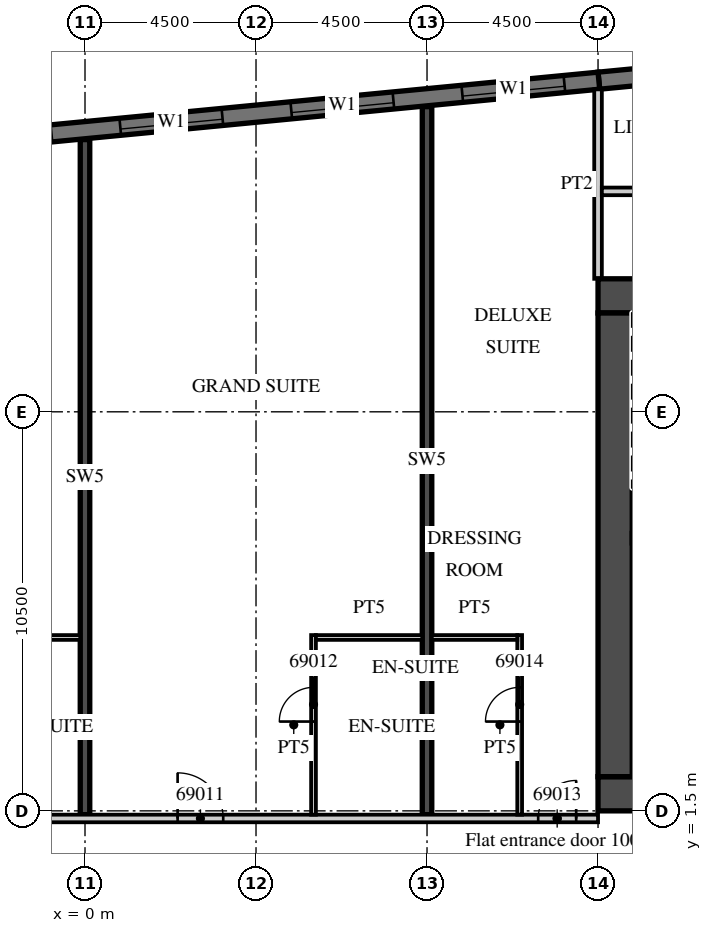
"""IFC4 building model, lengths in metres.
Left out: names, types, materials, properties, quantities, classifications, styles, units other than length and angle.
Written with IfcOpenShell. Run it as: python <this file> out.ifc"""

import sys

from ifc_helpers import new_model, si_unit, direction, frame, frame_2d, origin, place, context, subcontext, project, spatial, rectangle, extrude, element, fill, save


model = new_model("IFC4")
c1 = context("Model", 3, precision=1e-05, world=origin(), true_north=direction((0.0, 1.0)))
c2 = subcontext(c1, "Body", "Model", "MODEL_VIEW")
j1 = project(units=[si_unit("LENGTHUNIT", "METRE"), si_unit("PLANEANGLEUNIT", "RADIAN")], contexts=[c1])
p1 = place(None, origin())
s1 = spatial("IfcSite", under=j1, at=p1, CompositionType="ELEMENT")
p2 = place(p1, origin())
s2 = spatial("IfcBuilding", under=s1, at=p2, CompositionType="ELEMENT")
p3 = place(p2, frame((0.0, 0.0, 278.4)))
s3 = spatial("IfcBuildingStorey", under=s2, at=p3, CompositionType="ELEMENT", Elevation=278.4)
p4 = place(p3, frame((0.0, 1.4, 0.0), z_axis=(0.0, 0.0, 1.0), x_axis=(0.0, 1.0, 0.0)))
e1 = element("IfcWall", 1, at=p4, inside=s3, PredefinedType="SHEAR", context=c2, shape_type="SweptSolid", body=[
    extrude(rectangle(XDim=17.763, YDim=0.25, at=frame_2d((8.881, 0.0))), origin(), (0.0, 0.0, 1.0), 3.3),
])
p5 = place(p3, frame((9.0, 1.4, 0.0), z_axis=(0.0, 0.0, 1.0), x_axis=(0.0, 1.0, 0.0)))
e2 = element("IfcWall", 2, at=p5, inside=s3, PredefinedType="SHEAR", context=c2, shape_type="SweptSolid", body=[
    extrude(rectangle(XDim=18.629, YDim=0.25, at=frame_2d((9.315, 0.0))), origin(), (0.0, 0.0, 1.0), 3.3),
])
p6 = place(p3, frame((30.946, 22.391, 0.0), z_axis=(0.0, 0.0, 1.0), x_axis=(-0.995396397117, -0.095843688398, 0.0)))
e3 = element("IfcWall", 3, at=p6, inside=s3, PredefinedType="SOLIDWALL", context=c2, shape_type="SweptSolid", body=[
    extrude(rectangle(XDim=17.505, YDim=0.45, at=frame_2d((8.752, 0.0))), origin(), (0.0, 0.0, 1.0), 3.02),
])
p7 = place(p3, frame((13.521, 20.713, 0.0), z_axis=(0.0, 0.0, 1.0), x_axis=(-0.995396277313, -0.095844932638, 0.0)))
e4 = element("IfcWall", 4, at=p7, inside=s3, PredefinedType="SOLIDWALL", context=c2, shape_type="SweptSolid", body=[
    extrude(rectangle(XDim=51.495, YDim=0.45, at=frame_2d((25.748, 0.0))), origin(), (0.0, 0.0, 1.0), 3.02),
])
p8 = place(p7, frame((0.91, 0.0, 0.45)))
e5 = element("IfcOpeningElement", 5, at=p8, cuts=e4, PredefinedType="OPENING", context=c2, shape_type="SweptSolid", body=[
    extrude(rectangle(XDim=2.7, YDim=2.25, at=frame_2d((1.35, 1.125))), frame((0.0, 0.235, 0.0), z_axis=(0.0, -1.0, 0.0), x_axis=(1.0, 0.0, 0.0)), (0.0, 0.0, 1.0), 0.47),
])
p9 = place(p7, frame((5.431, 0.0, 0.45)))
e6 = element("IfcOpeningElement", 6, at=p9, cuts=e4, PredefinedType="OPENING", context=c2, shape_type="SweptSolid", body=[
    extrude(rectangle(XDim=2.7, YDim=2.25, at=frame_2d((1.35, 1.125))), frame((0.0, 0.235, 0.0), z_axis=(0.0, -1.0, 0.0), x_axis=(1.0, 0.0, 0.0)), (0.0, 0.0, 1.0), 0.47),
])
p10 = place(p7, frame((9.952, 0.0, 0.45)))
e7 = element("IfcOpeningElement", 7, at=p10, cuts=e4, PredefinedType="OPENING", context=c2, shape_type="SweptSolid", body=[
    extrude(rectangle(XDim=2.7, YDim=2.25, at=frame_2d((1.35, 1.125))), frame((0.0, 0.235, 0.0), z_axis=(0.0, -1.0, 0.0), x_axis=(1.0, 0.0, 0.0)), (0.0, 0.0, 1.0), 0.47),
])
p11 = place(p7, frame((14.473, 0.0, 0.45)))
e8 = element("IfcOpeningElement", 8, at=p11, cuts=e4, PredefinedType="OPENING", context=c2, shape_type="SweptSolid", body=[
    extrude(rectangle(XDim=2.7, YDim=2.25, at=frame_2d((1.35, 1.125))), frame((0.0, 0.235, 0.0), z_axis=(0.0, -1.0, 0.0), x_axis=(1.0, 0.0, 0.0)), (0.0, 0.0, 1.0), 0.47),
])
p12 = place(p7, frame((18.994, 0.0, 0.45)))
e9 = element("IfcOpeningElement", 9, at=p12, cuts=e4, PredefinedType="OPENING", context=c2, shape_type="SweptSolid", body=[
    extrude(rectangle(XDim=2.7, YDim=2.25, at=frame_2d((1.35, 1.125))), frame((0.0, 0.235, 0.0), z_axis=(0.0, -1.0, 0.0), x_axis=(1.0, 0.0, 0.0)), (0.0, 0.0, 1.0), 0.47),
])
p13 = place(p7, frame((23.514, 0.0, 0.45)))
e10 = element("IfcOpeningElement", 10, at=p13, cuts=e4, PredefinedType="OPENING", context=c2, shape_type="SweptSolid", body=[
    extrude(rectangle(XDim=2.7, YDim=2.25, at=frame_2d((1.35, 1.125))), frame((0.0, 0.235, 0.0), z_axis=(0.0, -1.0, 0.0), x_axis=(1.0, 0.0, 0.0)), (0.0, 0.0, 1.0), 0.47),
])
p14 = place(p7, frame((28.035, 0.0, 0.45)))
e11 = element("IfcOpeningElement", 11, at=p14, cuts=e4, PredefinedType="OPENING", context=c2, shape_type="SweptSolid", body=[
    extrude(rectangle(XDim=2.7, YDim=2.25, at=frame_2d((1.35, 1.125))), frame((0.0, 0.235, 0.0), z_axis=(0.0, -1.0, 0.0), x_axis=(1.0, 0.0, 0.0)), (0.0, 0.0, 1.0), 0.47),
])
p15 = place(p7, frame((32.556, 0.0, 0.45)))
e12 = element("IfcOpeningElement", 12, at=p15, cuts=e4, PredefinedType="OPENING", context=c2, shape_type="SweptSolid", body=[
    extrude(rectangle(XDim=2.7, YDim=2.25, at=frame_2d((1.35, 1.125))), frame((0.0, 0.235, 0.0), z_axis=(0.0, -1.0, 0.0), x_axis=(1.0, 0.0, 0.0)), (0.0, 0.0, 1.0), 0.47),
])
p16 = place(p7, frame((37.077, 0.0, 0.45)))
e13 = element("IfcOpeningElement", 13, at=p16, cuts=e4, PredefinedType="OPENING", context=c2, shape_type="SweptSolid", body=[
    extrude(rectangle(XDim=2.7, YDim=2.25, at=frame_2d((1.35, 1.125))), frame((0.0, 0.235, 0.0), z_axis=(0.0, -1.0, 0.0), x_axis=(1.0, 0.0, 0.0)), (0.0, 0.0, 1.0), 0.47),
])
p17 = place(p7, frame((41.598, 0.0, 0.45)))
e14 = element("IfcOpeningElement", 14, at=p17, cuts=e4, PredefinedType="OPENING", context=c2, shape_type="SweptSolid", body=[
    extrude(rectangle(XDim=2.7, YDim=2.25, at=frame_2d((1.35, 1.125))), frame((0.0, 0.235, 0.0), z_axis=(0.0, -1.0, 0.0), x_axis=(1.0, 0.0, 0.0)), (0.0, 0.0, 1.0), 0.47),
])
p18 = place(p7, frame((46.118, 0.0, 0.45)))
e15 = element("IfcOpeningElement", 15, at=p18, cuts=e4, PredefinedType="OPENING", context=c2, shape_type="SweptSolid", body=[
    extrude(rectangle(XDim=2.7, YDim=2.25, at=frame_2d((1.35, 1.125))), frame((0.0, 0.235, 0.0), z_axis=(0.0, -1.0, 0.0), x_axis=(1.0, 0.0, 0.0)), (0.0, 0.0, 1.0), 0.47),
])
p19 = place(p3, frame((13.5, 15.5, 0.0), z_axis=(0.0, 0.0, 1.0), x_axis=(0.0, 1.0, 0.0)))
e16 = element("IfcWall", 16, at=p19, inside=s3, PredefinedType="PARTITIONING", context=c2, shape_type="SweptSolid", body=[
    extrude(rectangle(XDim=4.985, YDim=0.2, at=frame_2d((2.493, 0.0))), origin(), (0.0, 0.0, 1.0), 3.02),
])
p20 = place(p3, frame((-39.909, 1.3, 0.0), z_axis=(0.0, 0.0, 1.0), x_axis=(1.0, 0.0, 0.0)))
e17 = element("IfcWall", 17, at=p20, inside=s3, PredefinedType="PARTITIONING", context=c2, shape_type="SweptSolid", body=[
    extrude(rectangle(XDim=53.409, YDim=0.2, at=frame_2d((26.705, 0.0))), origin(), (0.0, 0.0, 1.0), 3.02),
])
p21 = place(p20, frame((0.15, 0.0, 0.0)))
e18 = element("IfcOpeningElement", 18, at=p21, cuts=e17, PredefinedType="OPENING", context=c2, shape_type="SweptSolid", body=[
    extrude(rectangle(XDim=0.9, YDim=2.1, at=frame_2d((0.45, 1.05))), frame((0.0, 0.11, 0.0), z_axis=(0.0, -1.0, 0.0), x_axis=(1.0, 0.0, 0.0)), (0.0, 0.0, 1.0), 0.22),
])
p22 = place(p20, frame((6.347, 0.0, 0.0)))
e19 = element("IfcOpeningElement", 19, at=p22, cuts=e17, PredefinedType="OPENING", context=c2, shape_type="SweptSolid", body=[
    extrude(rectangle(XDim=1.2, YDim=2.1, at=frame_2d((0.6, 1.05))), frame((0.0, 0.11, 0.0), z_axis=(0.0, -1.0, 0.0), x_axis=(1.0, 0.0, 0.0)), (0.0, 0.0, 1.0), 0.22),
])
p23 = place(p20, frame((15.347, 0.0, 0.0)))
e20 = element("IfcOpeningElement", 20, at=p23, cuts=e17, PredefinedType="OPENING", context=c2, shape_type="SweptSolid", body=[
    extrude(rectangle(XDim=1.2, YDim=2.1, at=frame_2d((0.6, 1.05))), frame((0.0, 0.11, 0.0), z_axis=(0.0, -1.0, 0.0), x_axis=(1.0, 0.0, 0.0)), (0.0, 0.0, 1.0), 0.22),
])
p24 = place(p20, frame((24.346, 0.0, 0.0)))
e21 = element("IfcOpeningElement", 21, at=p24, cuts=e17, PredefinedType="OPENING", context=c2, shape_type="SweptSolid", body=[
    extrude(rectangle(XDim=1.2, YDim=2.1, at=frame_2d((0.6, 1.05))), frame((0.0, 0.11, 0.0), z_axis=(0.0, -1.0, 0.0), x_axis=(1.0, 0.0, 0.0)), (0.0, 0.0, 1.0), 0.22),
])
p25 = place(p20, frame((33.346, 0.0, 0.0)))
e22 = element("IfcOpeningElement", 22, at=p25, cuts=e17, PredefinedType="OPENING", context=c2, shape_type="SweptSolid", body=[
    extrude(rectangle(XDim=1.2, YDim=2.1, at=frame_2d((0.6, 1.05))), frame((0.0, 0.11, 0.0), z_axis=(0.0, -1.0, 0.0), x_axis=(1.0, 0.0, 0.0)), (0.0, 0.0, 1.0), 0.22),
])
p26 = place(p20, frame((42.346, 0.0, 0.0)))
e23 = element("IfcOpeningElement", 23, at=p26, cuts=e17, PredefinedType="OPENING", context=c2, shape_type="SweptSolid", body=[
    extrude(rectangle(XDim=1.2, YDim=2.1, at=frame_2d((0.6, 1.05))), frame((0.0, 0.11, 0.0), z_axis=(0.0, -1.0, 0.0), x_axis=(1.0, 0.0, 0.0)), (0.0, 0.0, 1.0), 0.22),
])
p27 = place(p20, frame((51.834, 0.0, 0.0)))
e24 = element("IfcOpeningElement", 24, at=p27, cuts=e17, PredefinedType="OPENING", context=c2, shape_type="SweptSolid", body=[
    extrude(rectangle(XDim=1.0, YDim=2.1, at=frame_2d((0.5, 1.05))), frame((0.0, 0.11, 0.0), z_axis=(0.0, -1.0, 0.0), x_axis=(1.0, 0.0, 0.0)), (0.0, 0.0, 1.0), 0.22),
])
p28 = place(p3, frame((-2.925, 6.062, 0.0), z_axis=(0.0, 0.0, 1.0), x_axis=(1.0, 0.0, 0.0)))
e25 = element("IfcWall", 25, at=p28, inside=s3, PredefinedType="PARTITIONING", context=c2, shape_type="SweptSolid", body=[
    extrude(rectangle(XDim=2.8, YDim=0.125, at=frame_2d((1.4, 0.0))), origin(), (0.0, 0.0, 1.0), 3.02),
])
p29 = place(p3, frame((6.013, 1.4, 0.0), z_axis=(0.0, 0.0, 1.0), x_axis=(0.0, 1.0, 0.0)))
e26 = element("IfcWall", 26, at=p29, inside=s3, PredefinedType="PARTITIONING", context=c2, shape_type="SweptSolid", body=[
    extrude(rectangle(XDim=4.725, YDim=0.125, at=frame_2d((2.363, 0.0))), origin(), (0.0, 0.0, 1.0), 3.02),
])
p30 = place(p29, frame((2.45, 0.0, 0.0)))
e27 = element("IfcOpeningElement", 27, at=p30, cuts=e26, PredefinedType="OPENING", context=c2, shape_type="SweptSolid", body=[
    extrude(rectangle(XDim=0.9, YDim=2.1, at=frame_2d((0.45, 1.05))), frame((0.0, 0.073, 0.0), z_axis=(0.0, -1.0, 0.0), x_axis=(1.0, 0.0, 0.0)), (0.0, 0.0, 1.0), 0.145),
])
p31 = place(p3, frame((6.075, 6.062, 0.0), z_axis=(0.0, 0.0, 1.0), x_axis=(1.0, 0.0, 0.0)))
e28 = element("IfcWall", 28, at=p31, inside=s3, PredefinedType="PARTITIONING", context=c2, shape_type="SweptSolid", body=[
    extrude(rectangle(XDim=2.8, YDim=0.125, at=frame_2d((1.4, 0.0))), origin(), (0.0, 0.0, 1.0), 3.02),
])
p32 = place(p3, frame((11.438, 1.4, 0.0), z_axis=(0.0, 0.0, 1.0), x_axis=(0.0, 1.0, 0.0)))
e29 = element("IfcWall", 29, at=p32, inside=s3, PredefinedType="PARTITIONING", context=c2, shape_type="SweptSolid", body=[
    extrude(rectangle(XDim=4.725, YDim=0.125, at=frame_2d((2.363, 0.0))), origin(), (0.0, 0.0, 1.0), 3.02),
])
p33 = place(p32, frame((2.45, 0.0, 0.0)))
e30 = element("IfcOpeningElement", 30, at=p33, cuts=e29, PredefinedType="OPENING", context=c2, shape_type="SweptSolid", body=[
    extrude(rectangle(XDim=0.9, YDim=2.1, at=frame_2d((0.45, 1.05))), frame((0.0, 0.073, 0.0), z_axis=(0.0, -1.0, 0.0), x_axis=(1.0, 0.0, 0.0)), (0.0, 0.0, 1.0), 0.145),
])
p34 = place(p3, frame((9.125, 6.062, 0.0), z_axis=(0.0, 0.0, 1.0), x_axis=(1.0, 0.0, 0.0)))
e31 = element("IfcWall", 31, at=p34, inside=s3, PredefinedType="PARTITIONING", context=c2, shape_type="SweptSolid", body=[
    extrude(rectangle(XDim=2.25, YDim=0.125, at=frame_2d((1.125, 0.0))), origin(), (0.0, 0.0, 1.0), 3.02),
])
p35 = place(p3, frame((13.5, 1.95, 0.0), z_axis=(0.0, 0.0, 1.0), x_axis=(1.0, 0.0, 0.0)))
e32 = element("IfcWall", 32, at=p35, inside=s3, PredefinedType="SHEAR", context=c2, shape_type="SweptSolid", body=[
    extrude(rectangle(XDim=18.0, YDim=0.9, at=frame_2d((9.0, 0.0))), origin(), (0.0, 0.0, 1.0), 3.02),
])
p36 = place(p35, frame((1.475, 0.0, 0.0)))
e33 = element("IfcOpeningElement", 33, at=p36, cuts=e32, PredefinedType="OPENING", context=c2, shape_type="SweptSolid", body=[
    extrude(rectangle(XDim=1.8, YDim=2.1, at=frame_2d((0.9, 1.05))), frame((0.0, 0.46, 0.0), z_axis=(0.0, -1.0, 0.0), x_axis=(1.0, 0.0, 0.0)), (0.0, 0.0, 1.0), 0.92),
])
p37 = place(p3, frame((13.5, 15.05, 0.0), z_axis=(0.0, 0.0, 1.0), x_axis=(1.0, 0.0, 0.0)))
e34 = element("IfcWall", 34, at=p37, inside=s3, PredefinedType="SHEAR", context=c2, shape_type="SweptSolid", body=[
    extrude(rectangle(XDim=6.8, YDim=0.9, at=frame_2d((3.4, 0.0))), origin(), (0.0, 0.0, 1.0), 3.02),
])
p38 = place(p37, frame((4.725, 0.0, 0.0)))
e35 = element("IfcOpeningElement", 35, at=p38, cuts=e34, PredefinedType="OPENING", context=c2, shape_type="SweptSolid", body=[
    extrude(rectangle(XDim=1.2, YDim=2.1, at=frame_2d((0.6, 1.05))), frame((0.0, 0.46, 0.0), z_axis=(0.0, -1.0, 0.0), x_axis=(1.0, 0.0, 0.0)), (0.0, 0.0, 1.0), 0.92),
])
p39 = place(p3, frame((13.95, 2.4, 0.0), z_axis=(0.0, 0.0, 1.0), x_axis=(0.0, 1.0, 0.0)))
e36 = element("IfcWall", 36, at=p39, inside=s3, PredefinedType="SHEAR", context=c2, shape_type="SweptSolid", body=[
    extrude(rectangle(XDim=12.2, YDim=0.9, at=frame_2d((6.1, 0.0))), origin(), (0.0, 0.0, 1.0), 3.02),
])
p40 = place(p3, frame((13.6, 17.8, 0.0), z_axis=(0.0, 0.0, 1.0), x_axis=(1.0, 0.0, 0.0)))
e37 = element("IfcWall", 37, at=p40, inside=s3, PredefinedType="PARTITIONING", context=c2, shape_type="SweptSolid", body=[
    extrude(rectangle(XDim=21.354, YDim=0.2, at=frame_2d((10.677, 0.0))), origin(), (0.0, 0.0, 1.0), 3.02),
])
p41 = place(p40, frame((16.613, 0.0, 0.0)))
e38 = element("IfcOpeningElement", 38, at=p41, cuts=e37, PredefinedType="OPENING", context=c2, shape_type="SweptSolid", body=[
    extrude(rectangle(XDim=0.9, YDim=2.1, at=frame_2d((0.45, 1.05))), frame((0.0, 0.11, 0.0), z_axis=(0.0, -1.0, 0.0), x_axis=(1.0, 0.0, 0.0)), (0.0, 0.0, 1.0), 0.22),
])
p42 = place(p40, frame((8.312, 0.0, 0.0)))
e39 = element("IfcOpeningElement", 39, at=p42, cuts=e37, PredefinedType="OPENING", context=c2, shape_type="SweptSolid", body=[
    extrude(rectangle(XDim=0.9, YDim=2.1, at=frame_2d((0.45, 1.05))), frame((0.0, 0.11, 0.0), z_axis=(0.0, -1.0, 0.0), x_axis=(1.0, 0.0, 0.0)), (0.0, 0.0, 1.0), 0.22),
])
p43 = place(p8, origin())
e40 = element("IfcWindow", 40, at=p43, inside=s3, PartitioningType="SINGLE_PANEL", PredefinedType="WINDOW", context=c2, shape_type="SweptSolid", body=[
    extrude(rectangle(XDim=2.7, YDim=2.25, at=frame_2d((1.35, 1.125))), frame((0.0, 0.09, 0.0), z_axis=(0.0, -1.0, 0.0), x_axis=(1.0, 0.0, 0.0)), (0.0, 0.0, 1.0), 0.06),
])
fill(e5, e40)
p44 = place(p9, origin())
e41 = element("IfcWindow", 41, at=p44, inside=s3, PartitioningType="SINGLE_PANEL", PredefinedType="WINDOW", context=c2, shape_type="SweptSolid", body=[
    extrude(rectangle(XDim=2.7, YDim=2.25, at=frame_2d((1.35, 1.125))), frame((0.0, 0.09, 0.0), z_axis=(0.0, -1.0, 0.0), x_axis=(1.0, 0.0, 0.0)), (0.0, 0.0, 1.0), 0.06),
])
fill(e6, e41)
p45 = place(p10, origin())
e42 = element("IfcWindow", 42, at=p45, inside=s3, PartitioningType="SINGLE_PANEL", PredefinedType="WINDOW", context=c2, shape_type="SweptSolid", body=[
    extrude(rectangle(XDim=2.7, YDim=2.25, at=frame_2d((1.35, 1.125))), frame((0.0, 0.09, 0.0), z_axis=(0.0, -1.0, 0.0), x_axis=(1.0, 0.0, 0.0)), (0.0, 0.0, 1.0), 0.06),
])
fill(e7, e42)
p46 = place(p26, origin())
e43 = element("IfcDoor", 43, at=p46, inside=s3, OperationType="SINGLE_SWING_LEFT", PredefinedType="DOOR", context=c2, shape_type="SweptSolid", body=[
    extrude(rectangle(XDim=1.2, YDim=2.1, at=frame_2d((0.6, 1.05))), frame((0.0, 0.025, 0.0), z_axis=(0.0, -1.0, 0.0), x_axis=(1.0, 0.0, 0.0)), (0.0, 0.0, 1.0), 0.05),
])
fill(e23, e43)
p47 = place(p30, origin())
e44 = element("IfcDoor", 44, at=p47, inside=s3, OperationType="SINGLE_SWING_LEFT", PredefinedType="DOOR", context=c2, shape_type="SweptSolid", body=[
    extrude(rectangle(XDim=0.9, YDim=2.1, at=frame_2d((0.45, 1.05))), frame((0.0, 0.025, 0.0), z_axis=(0.0, -1.0, 0.0), x_axis=(1.0, 0.0, 0.0)), (0.0, 0.0, 1.0), 0.05),
])
fill(e27, e44)
p48 = place(p27, origin())
e45 = element("IfcDoor", 45, at=p48, inside=s3, OperationType="SINGLE_SWING_RIGHT", PredefinedType="DOOR", context=c2, shape_type="SweptSolid", body=[
    extrude(rectangle(XDim=1.0, YDim=2.1, at=frame_2d((0.5, 1.05))), frame((0.0, 0.025, 0.0), z_axis=(0.0, -1.0, 0.0), x_axis=(1.0, 0.0, 0.0)), (0.0, 0.0, 1.0), 0.05),
])
fill(e24, e45)
p49 = place(p33, origin())
e46 = element("IfcDoor", 46, at=p49, inside=s3, OperationType="SINGLE_SWING_LEFT", PredefinedType="DOOR", context=c2, shape_type="SweptSolid", body=[
    extrude(rectangle(XDim=0.9, YDim=2.1, at=frame_2d((0.45, 1.05))), frame((0.0, 0.025, 0.0), z_axis=(0.0, -1.0, 0.0), x_axis=(1.0, 0.0, 0.0)), (0.0, 0.0, 1.0), 0.05),
])
fill(e30, e46)
save(model, sys.argv[1])
